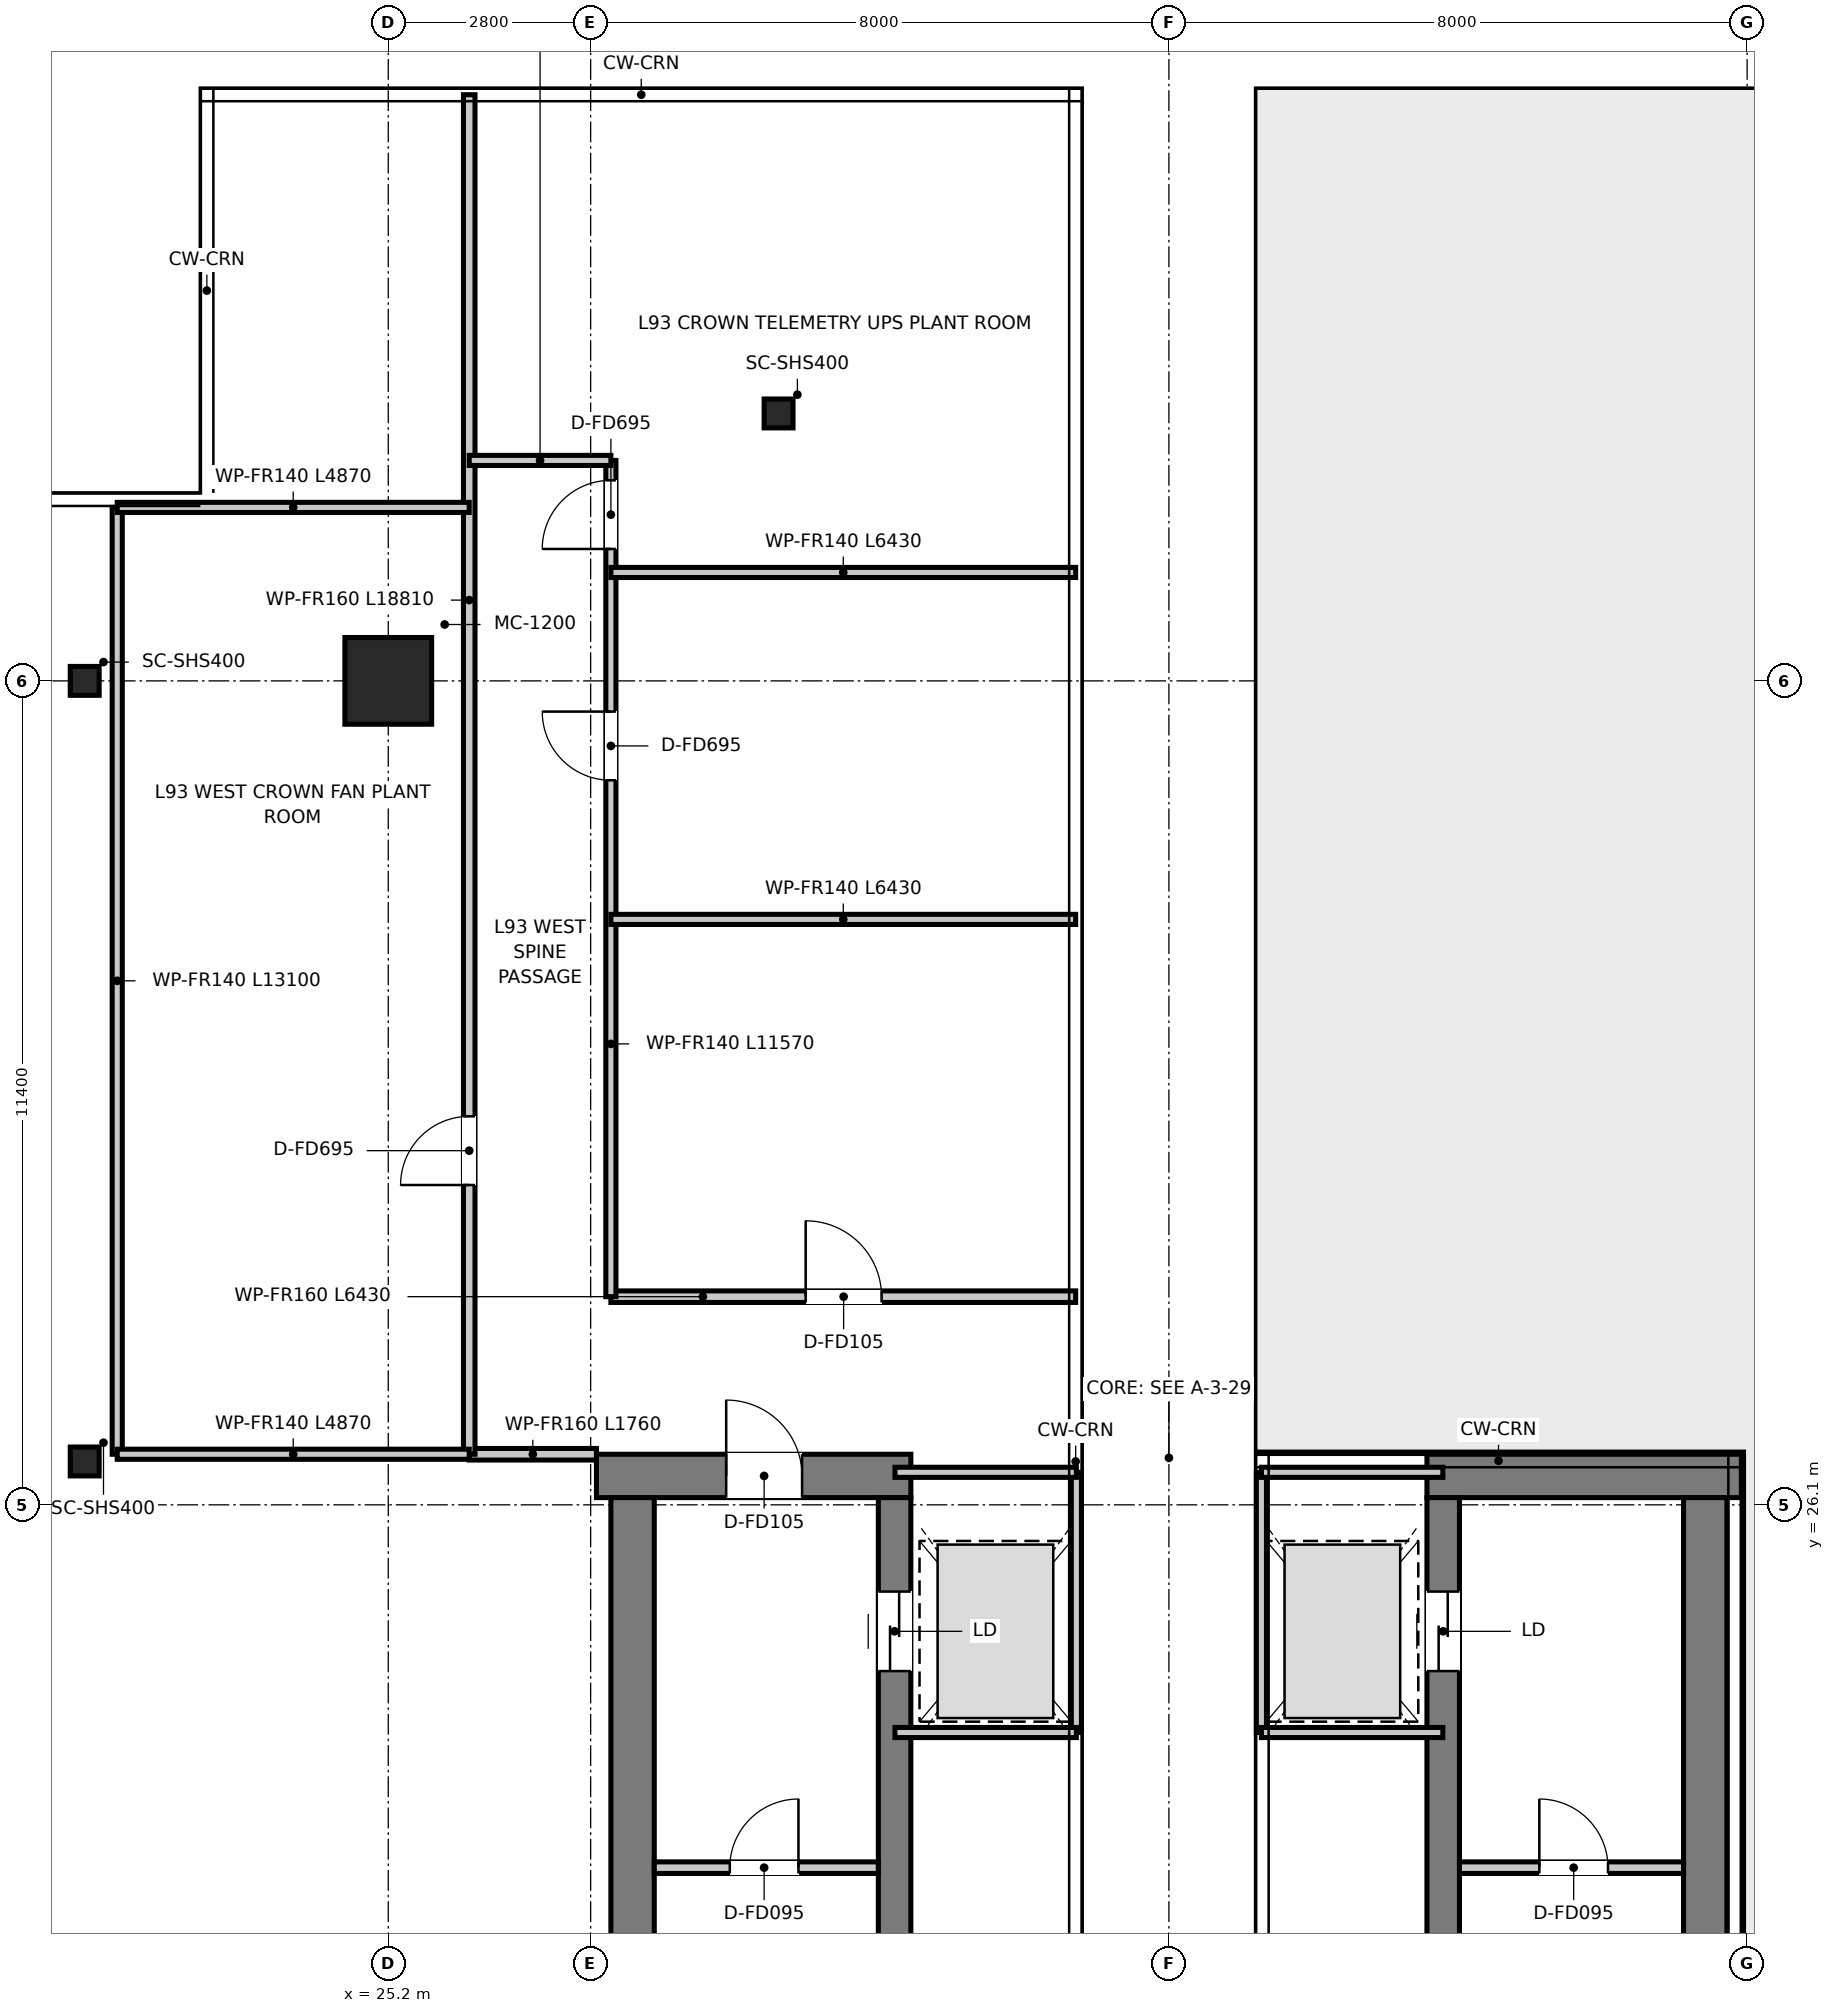
"""IFC4 building model, lengths in metres.
Left out: names, types, materials, properties, quantities, classifications, styles, units other than length and angle.
Written with IfcOpenShell. Run it as: python <this file> out.ifc"""

import sys

from ifc_helpers import new_model, si_unit, direction, frame, frame_2d, origin, origin_2d, place, context, subcontext, project, spatial, rectangle, hollow_rectangle, extrude, source, transform, mapped, element, fill, save


model = new_model("IFC4")
c1 = context("Model", 3, precision=1e-05, world=origin(), true_north=direction((0.0, 1.0)))
c2 = subcontext(c1, "Body", "Model", "MODEL_VIEW")
j1 = project(units=[si_unit("LENGTHUNIT", "METRE"), si_unit("PLANEANGLEUNIT", "RADIAN")], contexts=[c1])
p1 = place(None, origin())
s1 = spatial("IfcSite", under=j1, at=p1, CompositionType="ELEMENT")
p2 = place(p1, origin())
s2 = spatial("IfcBuilding", under=s1, at=p2, CompositionType="ELEMENT")
p3 = place(p2, frame((0.0, 0.0, 378.25)))
s3 = spatial("IfcBuildingStorey", under=s2, at=p3, CompositionType="ELEMENT", Elevation=378.25)
p4 = place(p3, frame((28.08, 26.5, 0.0), z_axis=(0.0, 0.0, 1.0), x_axis=(1.0, 0.0, 0.0)))
e1 = element("IfcWall", 1, at=p4, inside=s3, PredefinedType="SHEAR", context=c2, shape_type="SweptSolid", body=[
    extrude(rectangle(XDim=4.35, YDim=0.6, at=frame_2d((2.175, 0.0))), origin(), (0.0, 0.0, 1.0), 3.6),
])
p5 = place(p4, frame((1.795, 0.0, 0.0)))
e2 = element("IfcOpeningElement", 2, at=p5, cuts=e1, PredefinedType="OPENING", context=c2, shape_type="SweptSolid", body=[
    extrude(rectangle(XDim=1.05, YDim=2.1, at=frame_2d((0.525, 1.05))), frame((0.0, 0.31, 0.0), z_axis=(0.0, -1.0, 0.0), x_axis=(1.0, 0.0, 0.0)), (0.0, 0.0, 1.0), 0.62),
])
p6 = place(p3, frame((28.58, 11.1, 0.0), z_axis=(0.0, 0.0, 1.0), x_axis=(0.0, 1.0, 0.0)))
e3 = element("IfcWall", 3, at=p6, inside=s3, PredefinedType="SHEAR", context=c2, shape_type="SweptSolid", body=[
    extrude(rectangle(XDim=15.1, YDim=0.6, at=frame_2d((7.55, 0.0))), origin(), (0.0, 0.0, 1.0), 3.6),
])
p7 = place(p3, frame((32.205, 13.22, 0.0), z_axis=(0.0, 0.0, 1.0), x_axis=(0.0, 1.0, 0.0)))
e4 = element("IfcWall", 4, at=p7, inside=s3, PredefinedType="SHEAR", context=c2, shape_type="SweptSolid", body=[
    extrude(rectangle(XDim=12.98, YDim=0.45, at=frame_2d((6.49, 0.0))), origin(), (0.0, 0.0, 1.0), 3.6),
])
p8 = place(p7, frame((10.58, 0.0, 0.0)))
e5 = element("IfcOpeningElement", 5, at=p8, cuts=e4, PredefinedType="OPENING", context=c2, shape_type="SweptSolid", body=[
    extrude(rectangle(XDim=1.1, YDim=2.15, at=frame_2d((0.55, 1.075))), frame((0.0, 0.235, 0.0), z_axis=(0.0, -1.0, 0.0), x_axis=(1.0, 0.0, 0.0)), (0.0, 0.0, 1.0), 0.47),
])
p9 = place(p3, frame((39.57, 26.5, 0.0), z_axis=(0.0, 0.0, 1.0), x_axis=(1.0, 0.0, 0.0)))
e6 = element("IfcWall", 6, at=p9, inside=s3, PredefinedType="SHEAR", context=c2, shape_type="SweptSolid", body=[
    extrude(rectangle(XDim=4.35, YDim=0.6, at=frame_2d((2.175, 0.0))), origin(), (0.0, 0.0, 1.0), 3.6),
])
p10 = place(p3, frame((39.795, 13.22, 0.0), z_axis=(0.0, 0.0, 1.0), x_axis=(0.0, 1.0, 0.0)))
e7 = element("IfcWall", 7, at=p10, inside=s3, PredefinedType="SHEAR", context=c2, shape_type="SweptSolid", body=[
    extrude(rectangle(XDim=12.98, YDim=0.45, at=frame_2d((6.49, 0.0))), origin(), (0.0, 0.0, 1.0), 3.6),
])
p11 = place(p10, frame((10.58, 0.0, 0.0)))
e8 = element("IfcOpeningElement", 8, at=p11, cuts=e7, PredefinedType="OPENING", context=c2, shape_type="SweptSolid", body=[
    extrude(rectangle(XDim=1.1, YDim=2.15, at=frame_2d((0.55, 1.075))), frame((0.0, 0.235, 0.0), z_axis=(0.0, -1.0, 0.0), x_axis=(1.0, 0.0, 0.0)), (0.0, 0.0, 1.0), 0.47),
])
p12 = place(p3, frame((43.42, 11.1, 0.0), z_axis=(0.0, 0.0, 1.0), x_axis=(0.0, 1.0, 0.0)))
e9 = element("IfcWall", 9, at=p12, inside=s3, PredefinedType="SHEAR", context=c2, shape_type="SweptSolid", body=[
    extrude(rectangle(XDim=15.1, YDim=0.6, at=frame_2d((7.55, 0.0))), origin(), (0.0, 0.0, 1.0), 3.6),
])
m1 = source(origin(), c2, "Body", "SweptSolid", [
    extrude(rectangle(XDim=1.2, YDim=1.2, at=origin_2d()), origin(), (0.0, 0.0, 1.0), 3.6),
])
p13 = place(p3, frame((25.2, 37.5, 0.0), z_axis=(0.0, 0.0, 1.0), x_axis=(1.0, 0.0, 0.0)))
e10 = element("IfcColumn", 10, at=p13, inside=s3, PredefinedType="USERDEFINED", context=c2, shape_type="MappedRepresentation", body=[
    mapped(m1, transform((0.0, 0.0, 0.0), x_axis=(1.0, 0.0, 0.0), y_axis=(0.0, 1.0, 0.0), z_axis=(0.0, 0.0, 1.0), scale=1.0)),
])
m2 = source(origin(), c2, "Body", "SweptSolid", [
    extrude(hollow_rectangle(XDim=0.4, YDim=0.4, WallThickness=0.025, at=origin_2d()), origin(), (0.0, 0.0, 1.0), 3.6),
])
for number, where, z_axis, x_axis in (
    (11, (21.0, 26.7, 0.0), (0.0, 0.0, 1.0), (1.0, 0.0, 0.0)),
    (12, (21.0, 37.5, 0.0), (0.0, 0.0, 1.0), (1.0, 0.0, 0.0)),
    (13, (30.6, 41.2, 0.0), (0.0, 0.0, 1.0), (1.0, 0.0, 0.0)),
):
    element("IfcColumn", number, at=place(p3, frame(where, z_axis=z_axis, x_axis=x_axis)), inside=s3, PredefinedType="COLUMN", context=c2, shape_type="MappedRepresentation", body=[
        mapped(m2, transform((0.0, 0.0, 0.0), x_axis=(1.0, 0.0, 0.0), y_axis=(0.0, 1.0, 0.0), z_axis=(0.0, 0.0, 1.0), scale=1.0)),
    ])
p14 = place(p3, frame((28.88, 21.08, 0.0), z_axis=(0.0, 0.0, 1.0), x_axis=(1.0, 0.0, 0.0)))
e14 = element("IfcWall", 14, at=p14, inside=s3, PredefinedType="PARTITIONING", context=c2, shape_type="SweptSolid", body=[
    extrude(rectangle(XDim=3.1, YDim=0.16, at=frame_2d((1.55, 0.0))), origin(), (0.0, 0.0, 1.0), 3.3),
])
p15 = place(p14, frame((1.045, 0.0, 0.0)))
e15 = element("IfcOpeningElement", 15, at=p15, cuts=e14, PredefinedType="OPENING", context=c2, shape_type="SweptSolid", body=[
    extrude(rectangle(XDim=0.95, YDim=2.1, at=frame_2d((0.475, 1.05))), frame((0.0, 0.09, 0.0), z_axis=(0.0, -1.0, 0.0), x_axis=(1.0, 0.0, 0.0)), (0.0, 0.0, 1.0), 0.18),
])
p16 = place(p3, frame((34.72, 22.95, 0.0), z_axis=(0.0, 0.0, 1.0), x_axis=(0.0, 1.0, 0.0)))
e16 = element("IfcWall", 16, at=p16, inside=s3, PredefinedType="PARTITIONING", context=c2, shape_type="SweptSolid", body=[
    extrude(rectangle(XDim=3.6, YDim=0.14, at=frame_2d((1.8, 0.0))), origin(), (0.0, 0.0, 1.0), 3.3),
])
for number, where, z_axis, x_axis in (
    (17, (32.21, 22.95, 0.0), (0.0, 0.0, 1.0), (1.0, 0.0, 0.0)),
    (18, (32.21, 26.55, 0.0), (0.0, 0.0, 1.0), (1.0, 0.0, 0.0)),
):
    element("IfcWall", number, at=place(p3, frame(where, z_axis=z_axis, x_axis=x_axis)), inside=s3, PredefinedType="PARTITIONING", context=c2, shape_type="SweptSolid", body=[
        extrude(rectangle(XDim=2.51, YDim=0.14, at=frame_2d((1.255, 0.0))), origin(), (0.0, 0.0, 1.0), 3.3),
    ])
p17 = place(p3, frame((40.02, 21.08, 0.0), z_axis=(0.0, 0.0, 1.0), x_axis=(1.0, 0.0, 0.0)))
e19 = element("IfcWall", 19, at=p17, inside=s3, PredefinedType="PARTITIONING", context=c2, shape_type="SweptSolid", body=[
    extrude(rectangle(XDim=3.1, YDim=0.16, at=frame_2d((1.55, 0.0))), origin(), (0.0, 0.0, 1.0), 3.3),
])
p18 = place(p17, frame((1.105, 0.0, 0.0)))
e20 = element("IfcOpeningElement", 20, at=p18, cuts=e19, PredefinedType="OPENING", context=c2, shape_type="SweptSolid", body=[
    extrude(rectangle(XDim=0.95, YDim=2.1, at=frame_2d((0.475, 1.05))), frame((0.0, 0.09, 0.0), z_axis=(0.0, -1.0, 0.0), x_axis=(1.0, 0.0, 0.0)), (0.0, 0.0, 1.0), 0.18),
])
p19 = place(p3, frame((37.28, 22.95, 0.0), z_axis=(0.0, 0.0, 1.0), x_axis=(0.0, 1.0, 0.0)))
e21 = element("IfcWall", 21, at=p19, inside=s3, PredefinedType="PARTITIONING", context=c2, shape_type="SweptSolid", body=[
    extrude(rectangle(XDim=3.6, YDim=0.14, at=frame_2d((1.8, 0.0))), origin(), (0.0, 0.0, 1.0), 3.3),
])
for number, where, z_axis, x_axis in (
    (22, (37.28, 22.95, 0.0), (0.0, 0.0, 1.0), (1.0, 0.0, 0.0)),
    (23, (37.28, 26.55, 0.0), (0.0, 0.0, 1.0), (1.0, 0.0, 0.0)),
):
    element("IfcWall", number, at=place(p3, frame(where, z_axis=z_axis, x_axis=x_axis)), inside=s3, PredefinedType="PARTITIONING", context=c2, shape_type="SweptSolid", body=[
        extrude(rectangle(XDim=2.51, YDim=0.14, at=frame_2d((1.255, 0.0))), origin(), (0.0, 0.0, 1.0), 3.3),
    ])
p20 = place(p3, frame((28.28, 28.98, 0.0), z_axis=(0.0, 0.0, 1.0), x_axis=(1.0, 0.0, 0.0)))
e24 = element("IfcWall", 24, at=p20, inside=s3, PredefinedType="PARTITIONING", context=c2, shape_type="SweptSolid", body=[
    extrude(rectangle(XDim=6.43, YDim=0.16, at=frame_2d((3.215, 0.0))), origin(), (0.0, 0.0, 1.0), 2.81),
])
p21 = place(p20, frame((2.695, 0.0, 0.0)))
e25 = element("IfcOpeningElement", 25, at=p21, cuts=e24, PredefinedType="OPENING", context=c2, shape_type="SweptSolid", body=[
    extrude(rectangle(XDim=1.05, YDim=2.1, at=frame_2d((0.525, 1.05))), frame((0.0, 0.09, 0.0), z_axis=(0.0, -1.0, 0.0), x_axis=(1.0, 0.0, 0.0)), (0.0, 0.0, 1.0), 0.18),
])
p22 = place(p3, frame((26.32, 26.8, 0.0), z_axis=(0.0, 0.0, 1.0), x_axis=(1.0, 0.0, 0.0)))
e26 = element("IfcWall", 26, at=p22, inside=s3, PredefinedType="PARTITIONING", context=c2, shape_type="SweptSolid", body=[
    extrude(rectangle(XDim=1.76, YDim=0.16, at=frame_2d((0.88, 0.0))), origin(), (0.0, 0.0, 1.0), 3.3),
])
p23 = place(p3, frame((26.32, 26.8, 0.0), z_axis=(0.0, 0.0, 1.0), x_axis=(0.0, 1.0, 0.0)))
e27 = element("IfcWall", 27, at=p23, inside=s3, PredefinedType="PARTITIONING", context=c2, shape_type="SweptSolid", body=[
    extrude(rectangle(XDim=18.81, YDim=0.16, at=frame_2d((9.405, 0.0))), origin(), (0.0, 0.0, 1.0), 2.81),
])
p24 = place(p23, frame((3.725, 0.0, 0.0)))
e28 = element("IfcOpeningElement", 28, at=p24, cuts=e27, PredefinedType="OPENING", context=c2, shape_type="SweptSolid", body=[
    extrude(rectangle(XDim=0.95, YDim=2.1, at=frame_2d((0.475, 1.05))), frame((0.0, 0.09, 0.0), z_axis=(0.0, -1.0, 0.0), x_axis=(1.0, 0.0, 0.0)), (0.0, 0.0, 1.0), 0.18),
])
p25 = place(p3, frame((21.45, 26.8, 0.0), z_axis=(0.0, 0.0, 1.0), x_axis=(0.0, 1.0, 0.0)))
e29 = element("IfcWall", 29, at=p25, inside=s3, PredefinedType="PARTITIONING", context=c2, shape_type="SweptSolid", body=[
    extrude(rectangle(XDim=13.1, YDim=0.14, at=frame_2d((6.55, 0.0))), origin(), (0.0, 0.0, 1.0), 2.81),
])
p26 = place(p3, frame((21.45, 26.8, 0.0), z_axis=(0.0, 0.0, 1.0), x_axis=(1.0, 0.0, 0.0)))
e30 = element("IfcWall", 30, at=p26, inside=s3, PredefinedType="PARTITIONING", context=c2, shape_type="SweptSolid", body=[
    extrude(rectangle(XDim=4.87, YDim=0.14, at=frame_2d((2.435, 0.0))), origin(), (0.0, 0.0, 1.0), 2.81),
])
p27 = place(p3, frame((21.45, 39.9, 0.0), z_axis=(0.0, 0.0, 1.0), x_axis=(1.0, 0.0, 0.0)))
e31 = element("IfcWall", 31, at=p27, inside=s3, PredefinedType="PARTITIONING", context=c2, shape_type="SweptSolid", body=[
    extrude(rectangle(XDim=4.87, YDim=0.14, at=frame_2d((2.435, 0.0))), origin(), (0.0, 0.0, 1.0), 3.3),
])
p28 = place(p3, frame((28.28, 28.98, 0.0), z_axis=(0.0, 0.0, 1.0), x_axis=(0.0, 1.0, 0.0)))
e32 = element("IfcWall", 32, at=p28, inside=s3, PredefinedType="PARTITIONING", context=c2, shape_type="SweptSolid", body=[
    extrude(rectangle(XDim=11.57, YDim=0.14, at=frame_2d((5.785, 0.0))), origin(), (0.0, 0.0, 1.0), 2.81),
])
p29 = place(p28, frame((7.145, 0.0, 0.0)))
e33 = element("IfcOpeningElement", 33, at=p29, cuts=e32, PredefinedType="OPENING", context=c2, shape_type="SweptSolid", body=[
    extrude(rectangle(XDim=0.95, YDim=2.1, at=frame_2d((0.475, 1.05))), frame((0.0, 0.08, 0.0), z_axis=(0.0, -1.0, 0.0), x_axis=(1.0, 0.0, 0.0)), (0.0, 0.0, 1.0), 0.16),
])
p30 = place(p28, frame((10.345, 0.0, 0.0)))
e34 = element("IfcOpeningElement", 34, at=p30, cuts=e32, PredefinedType="OPENING", context=c2, shape_type="SweptSolid", body=[
    extrude(rectangle(XDim=0.95, YDim=2.1, at=frame_2d((0.475, 1.05))), frame((0.0, 0.08, 0.0), z_axis=(0.0, -1.0, 0.0), x_axis=(1.0, 0.0, 0.0)), (0.0, 0.0, 1.0), 0.16),
])
for number, where, z_axis, x_axis in (
    (35, (28.28, 34.2, 0.0), (0.0, 0.0, 1.0), (1.0, 0.0, 0.0)),
    (36, (28.28, 39.0, 0.0), (0.0, 0.0, 1.0), (1.0, 0.0, 0.0)),
):
    element("IfcWall", number, at=place(p3, frame(where, z_axis=z_axis, x_axis=x_axis)), inside=s3, PredefinedType="PARTITIONING", context=c2, shape_type="SweptSolid", body=[
        extrude(rectangle(XDim=6.43, YDim=0.14, at=frame_2d((3.215, 0.0))), origin(), (0.0, 0.0, 1.0), 2.81),
    ])
p31 = place(p3, frame((26.32, 40.55, 0.0), z_axis=(0.0, 0.0, 1.0), x_axis=(1.0, 0.0, 0.0)))
e37 = element("IfcWall", 37, at=p31, inside=s3, PredefinedType="PARTITIONING", context=c2, shape_type="SweptSolid", body=[
    extrude(rectangle(XDim=1.96, YDim=0.14, at=frame_2d((0.98, 0.0))), origin(), (0.0, 0.0, 1.0), 3.3),
])
p32 = place(p15, origin())
e38 = element("IfcDoor", 38, at=p32, inside=s3, OperationType="SINGLE_SWING_RIGHT", PredefinedType="DOOR", context=c2, shape_type="SweptSolid", body=[
    extrude(rectangle(XDim=0.95, YDim=2.1, at=frame_2d((0.475, 1.05))), frame((0.0, 0.025, 0.0), z_axis=(0.0, -1.0, 0.0), x_axis=(1.0, 0.0, 0.0)), (0.0, 0.0, 1.0), 0.05),
])
fill(e15, e38)
p33 = place(p8, origin())
e39 = element("IfcDoor", 39, at=p33, inside=s3, OperationType="DOUBLE_DOOR_SLIDING", PredefinedType="DOOR", context=c2, shape_type="SweptSolid", body=[
    extrude(rectangle(XDim=1.1, YDim=2.15, at=frame_2d((0.55, 1.075))), frame((0.0, 0.025, 0.0), z_axis=(0.0, -1.0, 0.0), x_axis=(1.0, 0.0, 0.0)), (0.0, 0.0, 1.0), 0.05),
])
fill(e5, e39)
p34 = place(p5, origin())
e40 = element("IfcDoor", 40, at=p34, inside=s3, OperationType="SINGLE_SWING_LEFT", PredefinedType="DOOR", context=c2, shape_type="SweptSolid", body=[
    extrude(rectangle(XDim=1.05, YDim=2.1, at=frame_2d((0.525, 1.05))), frame((0.0, 0.025, 0.0), z_axis=(0.0, -1.0, 0.0), x_axis=(1.0, 0.0, 0.0)), (0.0, 0.0, 1.0), 0.05),
])
fill(e2, e40)
p35 = place(p18, origin())
e41 = element("IfcDoor", 41, at=p35, inside=s3, OperationType="SINGLE_SWING_LEFT", PredefinedType="DOOR", context=c2, shape_type="SweptSolid", body=[
    extrude(rectangle(XDim=0.95, YDim=2.1, at=frame_2d((0.475, 1.05))), frame((0.0, 0.025, 0.0), z_axis=(0.0, -1.0, 0.0), x_axis=(1.0, 0.0, 0.0)), (0.0, 0.0, 1.0), 0.05),
])
fill(e20, e41)
p36 = place(p11, origin())
e42 = element("IfcDoor", 42, at=p36, inside=s3, OperationType="DOUBLE_DOOR_SLIDING", PredefinedType="DOOR", context=c2, shape_type="SweptSolid", body=[
    extrude(rectangle(XDim=1.1, YDim=2.15, at=frame_2d((0.55, 1.075))), frame((0.0, 0.025, 0.0), z_axis=(0.0, -1.0, 0.0), x_axis=(1.0, 0.0, 0.0)), (0.0, 0.0, 1.0), 0.05),
])
fill(e8, e42)
p37 = place(p21, origin())
e43 = element("IfcDoor", 43, at=p37, inside=s3, OperationType="SINGLE_SWING_LEFT", PredefinedType="DOOR", context=c2, shape_type="SweptSolid", body=[
    extrude(rectangle(XDim=1.05, YDim=2.1, at=frame_2d((0.525, 1.05))), frame((0.0, 0.025, 0.0), z_axis=(0.0, -1.0, 0.0), x_axis=(1.0, 0.0, 0.0)), (0.0, 0.0, 1.0), 0.05),
])
fill(e25, e43)
p38 = place(p29, origin())
e44 = element("IfcDoor", 44, at=p38, inside=s3, OperationType="SINGLE_SWING_RIGHT", PredefinedType="DOOR", context=c2, shape_type="SweptSolid", body=[
    extrude(rectangle(XDim=0.95, YDim=2.1, at=frame_2d((0.475, 1.05))), frame((0.0, 0.025, 0.0), z_axis=(0.0, -1.0, 0.0), x_axis=(1.0, 0.0, 0.0)), (0.0, 0.0, 1.0), 0.05),
])
fill(e33, e44)
p39 = place(p30, origin())
e45 = element("IfcDoor", 45, at=p39, inside=s3, OperationType="SINGLE_SWING_LEFT", PredefinedType="DOOR", context=c2, shape_type="SweptSolid", body=[
    extrude(rectangle(XDim=0.95, YDim=2.1, at=frame_2d((0.475, 1.05))), frame((0.0, 0.025, 0.0), z_axis=(0.0, -1.0, 0.0), x_axis=(1.0, 0.0, 0.0)), (0.0, 0.0, 1.0), 0.05),
])
fill(e34, e45)
p40 = place(p24, origin())
e46 = element("IfcDoor", 46, at=p40, inside=s3, OperationType="SINGLE_SWING_LEFT", PredefinedType="DOOR", context=c2, shape_type="SweptSolid", body=[
    extrude(rectangle(XDim=0.95, YDim=2.1, at=frame_2d((0.475, 1.05))), frame((0.0, 0.025, 0.0), z_axis=(0.0, -1.0, 0.0), x_axis=(1.0, 0.0, 0.0)), (0.0, 0.0, 1.0), 0.05),
])
fill(e28, e46)
save(model, sys.argv[1])
